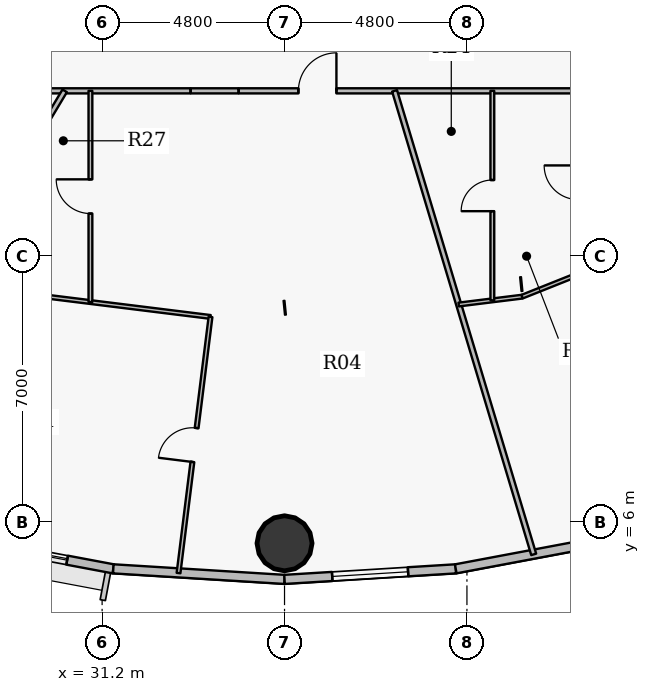
"""IFC4 building model, lengths in metres.
Left out: names, types, materials, properties, quantities, classifications, styles, units other than length and angle.
Written with IfcOpenShell. Run it as: python <this file> out.ifc"""

import sys

from ifc_helpers import new_model, si_unit, direction, frame, frame_2d, origin, origin_2d, place, context, subcontext, project, spatial, rectangle, hollow_circle, extrude, source, transform, mapped, element, fill, save


model = new_model("IFC4")
c1 = context("Model", 3, precision=1e-05, world=origin(), true_north=direction((0.0, 1.0)))
c2 = subcontext(c1, "Body", "Model", "MODEL_VIEW")
j1 = project(units=[si_unit("LENGTHUNIT", "METRE"), si_unit("PLANEANGLEUNIT", "RADIAN")], contexts=[c1])
p1 = place(None, origin())
s1 = spatial("IfcSite", under=j1, at=p1, CompositionType="ELEMENT")
p2 = place(p1, origin())
s2 = spatial("IfcBuilding", under=s1, at=p2, CompositionType="ELEMENT")
p3 = place(p2, frame((0.0, 0.0, 97.2)))
s3 = spatial("IfcBuildingStorey", under=s2, at=p3, CompositionType="ELEMENT", Elevation=97.2)
p4 = place(p3, frame((36.0, 5.445, 0.0), z_axis=(0.0, 0.0, 1.0), x_axis=(1.0, 0.0, 0.0)))
e1 = element("IfcColumn", 1, at=p4, inside=s3, PredefinedType="COLUMN", context=c2, shape_type="SweptSolid", body=[
    extrude(hollow_circle(Radius=0.725, WallThickness=0.042, at=origin_2d()), origin(), (0.0, 0.0, 1.0), 3.75),
])
p5 = place(p3, frame((31.494, 4.773, 0.0), z_axis=(0.0, 0.0, 1.0), x_axis=(-0.982789252177, 0.184730305596, 0.0)))
e2 = element("IfcWall", 2, at=p5, inside=s3, PredefinedType="SOLIDWALL", context=c2, shape_type="SweptSolid", body=[
    extrude(rectangle(XDim=4.471, YDim=0.24, at=frame_2d((2.235, 0.0))), origin(), (0.0, 0.0, 1.0), 3.5),
])
p6 = place(p5, frame((1.236, 0.0, 0.9)))
e3 = element("IfcOpeningElement", 3, at=p6, cuts=e2, PredefinedType="OPENING", context=c2, shape_type="SweptSolid", body=[
    extrude(rectangle(XDim=2.0, YDim=1.75, at=origin_2d()), frame((1.0, 0.13, 0.875), z_axis=(0.0, -1.0, 0.0), x_axis=(1.0, 0.0, 0.0)), (0.0, 0.0, 1.0), 0.26),
])
p7 = place(p3, frame((36.0, 4.495, 0.0), z_axis=(0.0, 0.0, 1.0), x_axis=(-0.998107531589, 0.061492726276, 0.0)))
e4 = element("IfcWall", 4, at=p7, inside=s3, PredefinedType="SOLIDWALL", context=c2, shape_type="SweptSolid", body=[
    extrude(rectangle(XDim=4.514, YDim=0.24, at=frame_2d((2.257, 0.0))), origin(), (0.0, 0.0, 1.0), 3.5),
])
p8 = place(p3, frame((40.506, 4.773, 0.0), z_axis=(0.0, 0.0, 1.0), x_axis=(-0.998107531589, -0.061492726276, 0.0)))
e5 = element("IfcWall", 5, at=p8, inside=s3, PredefinedType="SOLIDWALL", context=c2, shape_type="SweptSolid", body=[
    extrude(rectangle(XDim=4.514, YDim=0.24, at=frame_2d((2.257, 0.0))), origin(), (0.0, 0.0, 1.0), 3.5),
])
p9 = place(p8, frame((1.257, 0.0, 0.9)))
e6 = element("IfcOpeningElement", 6, at=p9, cuts=e5, PredefinedType="OPENING", context=c2, shape_type="SweptSolid", body=[
    extrude(rectangle(XDim=2.0, YDim=1.75, at=origin_2d()), frame((1.0, 0.13, 0.875), z_axis=(0.0, -1.0, 0.0), x_axis=(1.0, 0.0, 0.0)), (0.0, 0.0, 1.0), 0.26),
])
p10 = place(p3, frame((44.9, 5.599, 0.0), z_axis=(0.0, 0.0, 1.0), x_axis=(-0.982789252177, -0.184730305596, 0.0)))
e7 = element("IfcWall", 7, at=p10, inside=s3, PredefinedType="SOLIDWALL", context=c2, shape_type="SweptSolid", body=[
    extrude(rectangle(XDim=4.471, YDim=0.24, at=frame_2d((2.235, 0.0))), origin(), (0.0, 0.0, 1.0), 3.5),
])
p11 = place(p3, frame((23.15, 17.35, 0.0), z_axis=(0.0, 0.0, 1.0), x_axis=(1.0, 0.0, 0.0)))
e8 = element("IfcWall", 8, at=p11, inside=s3, PredefinedType="PARTITIONING", context=c2, shape_type="SweptSolid", body=[
    extrude(rectangle(XDim=10.373, YDim=0.135, at=frame_2d((5.187, 0.0))), origin(), (0.0, 0.0, 1.0), 2.935),
])
p12 = place(p11, frame((0.44, 0.0, 0.0)))
e9 = element("IfcOpeningElement", 9, at=p12, cuts=e8, PredefinedType="OPENING", context=c2, shape_type="SweptSolid", body=[
    extrude(rectangle(XDim=1.0, YDim=2.15, at=origin_2d()), frame((0.5, 0.078, 1.075), z_axis=(0.0, -1.0, 0.0), x_axis=(1.0, 0.0, 0.0)), (0.0, 0.0, 1.0), 0.155),
])
p13 = place(p3, frame((23.808, 6.661, 0.0), z_axis=(0.0, 0.0, 1.0), x_axis=(0.51416439954, 0.857691652195, 0.0)))
e10 = element("IfcWall", 10, at=p13, inside=s3, PredefinedType="PARTITIONING", context=c2, shape_type="SweptSolid", body=[
    extrude(rectangle(XDim=12.462, YDim=0.135, at=frame_2d((6.231, 0.0))), origin(), (0.0, 0.0, 1.0), 2.935),
])
p14 = place(p3, frame((29.749, 11.934, 0.0), z_axis=(0.0, 0.0, 1.0), x_axis=(0.992398657051, -0.123064639455, 0.0)))
e11 = element("IfcWall", 11, at=p14, inside=s3, PredefinedType="PARTITIONING", context=c2, shape_type="SweptSolid", body=[
    extrude(rectangle(XDim=4.337, YDim=0.1, at=frame_2d((2.168, 0.0))), origin(), (0.0, 0.0, 1.0), 3.5),
])
p15 = place(p3, frame((30.892, 11.792, 0.0), z_axis=(0.0, 0.0, 1.0), x_axis=(0.0, 1.0, 0.0)))
e12 = element("IfcWall", 12, at=p15, inside=s3, PredefinedType="PARTITIONING", context=c2, shape_type="SweptSolid", body=[
    extrude(rectangle(XDim=5.558, YDim=0.1, at=frame_2d((2.779, 0.0))), origin(), (0.0, 0.0, 1.0), 3.5),
])
p16 = place(p15, frame((2.329, 0.0, 0.0)))
e13 = element("IfcOpeningElement", 13, at=p16, cuts=e12, PredefinedType="OPENING", context=c2, shape_type="SweptSolid", body=[
    extrude(rectangle(XDim=0.9, YDim=2.1, at=origin_2d()), frame((0.45, 0.06, 1.05), z_axis=(0.0, -1.0, 0.0), x_axis=(1.0, 0.0, 0.0)), (0.0, 0.0, 1.0), 0.12),
])
p17 = place(p3, frame((33.211, 4.662, 0.0), z_axis=(0.0, 0.0, 1.0), x_axis=(0.123884295517, 0.992296670016, 0.0)))
e14 = element("IfcWall", 14, at=p17, inside=s3, PredefinedType="PARTITIONING", context=c2, shape_type="SweptSolid", body=[
    extrude(rectangle(XDim=6.791, YDim=0.1, at=frame_2d((3.396, 0.0))), origin(), (0.0, 0.0, 1.0), 2.935),
])
p18 = place(p17, frame((2.946, 0.0, 0.0)))
e15 = element("IfcOpeningElement", 15, at=p18, cuts=e14, PredefinedType="OPENING", context=c2, shape_type="SweptSolid", body=[
    extrude(rectangle(XDim=0.9, YDim=2.1, at=origin_2d()), frame((0.45, 0.06, 1.05), z_axis=(0.0, -1.0, 0.0), x_axis=(1.0, 0.0, 0.0)), (0.0, 0.0, 1.0), 0.12),
])
p19 = place(p3, frame((34.795, 17.35, 0.0), z_axis=(0.0, 0.0, 1.0), x_axis=(1.0, 0.0, 0.0)))
e16 = element("IfcWall", 16, at=p19, inside=s3, PredefinedType="PARTITIONING", context=c2, shape_type="SweptSolid", body=[
    extrude(rectangle(XDim=14.055, YDim=0.135, at=frame_2d((7.028, 0.0))), origin(), (0.0, 0.0, 1.0), 2.935),
])
p20 = place(p19, frame((1.571, 0.0, 0.0)))
e17 = element("IfcOpeningElement", 17, at=p20, cuts=e16, PredefinedType="OPENING", context=c2, shape_type="SweptSolid", body=[
    extrude(rectangle(XDim=1.0, YDim=2.15, at=origin_2d()), frame((0.5, 0.078, 1.075), z_axis=(0.0, -1.0, 0.0), x_axis=(1.0, 0.0, 0.0)), (0.0, 0.0, 1.0), 0.155),
])
p21 = place(p19, frame((10.976, 0.0, 0.0)))
e18 = element("IfcOpeningElement", 18, at=p21, cuts=e16, PredefinedType="OPENING", context=c2, shape_type="SweptSolid", body=[
    extrude(rectangle(XDim=1.0, YDim=2.15, at=origin_2d()), frame((0.5, 0.078, 1.075), z_axis=(0.0, -1.0, 0.0), x_axis=(1.0, 0.0, 0.0)), (0.0, 0.0, 1.0), 0.155),
])
p22 = place(p3, frame((38.896, 17.35, 0.0), z_axis=(0.0, 0.0, 1.0), x_axis=(0.287463970392, -0.957791452105, 0.0)))
e19 = element("IfcWall", 19, at=p22, inside=s3, PredefinedType="PARTITIONING", context=c2, shape_type="SweptSolid", body=[
    extrude(rectangle(XDim=12.734, YDim=0.135, at=frame_2d((6.367, 0.0))), origin(), (0.0, 0.0, 1.0), 2.935),
])
p23 = place(p3, frame((40.584, 11.728, 0.0), z_axis=(0.0, 0.0, 1.0), x_axis=(0.992400317705, 0.123051247123, 0.0)))
e20 = element("IfcWall", 20, at=p23, inside=s3, PredefinedType="PARTITIONING", context=c2, shape_type="SweptSolid", body=[
    extrude(rectangle(XDim=1.68, YDim=0.1, at=frame_2d((0.84, 0.0))), origin(), (0.0, 0.0, 1.0), 2.935),
])
p24 = place(p3, frame((41.469, 11.837, 0.0), z_axis=(0.0, 0.0, 1.0), x_axis=(0.0, 1.0, 0.0)))
e21 = element("IfcWall", 21, at=p24, inside=s3, PredefinedType="PARTITIONING", context=c2, shape_type="SweptSolid", body=[
    extrude(rectangle(XDim=5.513, YDim=0.1, at=frame_2d((2.756, 0.0))), origin(), (0.0, 0.0, 1.0), 2.935),
])
p25 = place(p24, frame((2.346, 0.0, 0.0)))
e22 = element("IfcOpeningElement", 22, at=p25, cuts=e21, PredefinedType="OPENING", context=c2, shape_type="SweptSolid", body=[
    extrude(rectangle(XDim=0.82, YDim=2.1, at=origin_2d()), frame((0.41, 0.06, 1.05), z_axis=(0.0, -1.0, 0.0), x_axis=(1.0, 0.0, 0.0)), (0.0, 0.0, 1.0), 0.12),
])
p26 = place(p3, frame((42.251, 11.934, 0.0), z_axis=(0.0, 0.0, 1.0), x_axis=(0.928805351872, 0.370567967226, 0.0)))
e23 = element("IfcWall", 23, at=p26, inside=s3, PredefinedType="PARTITIONING", context=c2, shape_type="SweptSolid", body=[
    extrude(rectangle(XDim=5.322, YDim=0.1, at=frame_2d((2.661, 0.0))), origin(), (0.0, 0.0, 1.0), 2.935),
])
p27 = place(p3, frame((34.785, 17.35, 0.0), z_axis=(0.0, 0.0, 1.0), x_axis=(-1.0, 0.0, 0.0)))
e24 = element("IfcWall", 24, at=p27, inside=s3, PredefinedType="PARTITIONING", context=c2, shape_type="SweptSolid", body=[
    extrude(rectangle(XDim=1.252, YDim=0.135, at=frame_2d((0.626, 0.0))), origin(), (0.0, 0.0, 1.0), 3.5),
])
m1 = source(origin(), c2, "Body", "SweptSolid", [
    extrude(rectangle(XDim=2.0, YDim=1.75, at=origin_2d()), frame((1.0, 0.03, 0.875), z_axis=(0.0, -1.0, 0.0), x_axis=(1.0, 0.0, 0.0)), (0.0, 0.0, 1.0), 0.06),
])
p28 = place(p6, origin())
e25 = element("IfcWindow", 25, at=p28, inside=s3, PartitioningType="DOUBLE_PANEL_VERTICAL", PredefinedType="WINDOW", context=c2, shape_type="MappedRepresentation", body=[
    mapped(m1, transform((0.0, 0.0, 0.0), x_axis=(1.0, 0.0, 0.0), y_axis=(0.0, 1.0, 0.0), z_axis=(0.0, 0.0, 1.0), scale=1.0)),
])
fill(e3, e25)
p29 = place(p9, origin())
e26 = element("IfcWindow", 26, at=p29, inside=s3, PartitioningType="DOUBLE_PANEL_VERTICAL", PredefinedType="WINDOW", context=c2, shape_type="MappedRepresentation", body=[
    mapped(m1, transform((0.0, 0.0, 0.0), x_axis=(1.0, 0.0, 0.0), y_axis=(0.0, 1.0, 0.0), z_axis=(0.0, 0.0, 1.0), scale=1.0)),
])
fill(e6, e26)
m2 = source(origin(), c2, "Body", "SweptSolid", [
    extrude(rectangle(XDim=1.0, YDim=2.15, at=origin_2d()), frame((0.5, 0.025, 1.075), z_axis=(0.0, -1.0, 0.0), x_axis=(1.0, 0.0, 0.0)), (0.0, 0.0, 1.0), 0.05),
])
p30 = place(p20, origin())
e27 = element("IfcDoor", 27, at=p30, inside=s3, OperationType="SINGLE_SWING_RIGHT", PredefinedType="DOOR", context=c2, shape_type="MappedRepresentation", body=[
    mapped(m2, transform((0.0, 0.0, 0.0), x_axis=(1.0, 0.0, 0.0), y_axis=(0.0, 1.0, 0.0), z_axis=(0.0, 0.0, 1.0), scale=1.0)),
])
fill(e17, e27)
m3 = source(origin(), c2, "Body", "SweptSolid", [
    extrude(rectangle(XDim=0.9, YDim=2.1, at=origin_2d()), frame((0.45, 0.025, 1.05), z_axis=(0.0, -1.0, 0.0), x_axis=(1.0, 0.0, 0.0)), (0.0, 0.0, 1.0), 0.05),
])
p31 = place(p18, origin())
e28 = element("IfcDoor", 28, at=p31, inside=s3, OperationType="SINGLE_SWING_LEFT", PredefinedType="DOOR", context=c2, shape_type="MappedRepresentation", body=[
    mapped(m3, transform((0.0, 0.0, 0.0), x_axis=(1.0, 0.0, 0.0), y_axis=(0.0, 1.0, 0.0), z_axis=(0.0, 0.0, 1.0), scale=1.0)),
])
fill(e15, e28)
p32 = place(p16, origin())
e29 = element("IfcDoor", 29, at=p32, inside=s3, OperationType="SINGLE_SWING_RIGHT", PredefinedType="DOOR", context=c2, shape_type="MappedRepresentation", body=[
    mapped(m3, transform((0.0, 0.0, 0.0), x_axis=(1.0, 0.0, 0.0), y_axis=(0.0, 1.0, 0.0), z_axis=(0.0, 0.0, 1.0), scale=1.0)),
])
fill(e13, e29)
m4 = source(origin(), c2, "Body", "SweptSolid", [
    extrude(rectangle(XDim=0.82, YDim=2.1, at=origin_2d()), frame((0.41, 0.025, 1.05), z_axis=(0.0, -1.0, 0.0), x_axis=(1.0, 0.0, 0.0)), (0.0, 0.0, 1.0), 0.05),
])
p33 = place(p25, origin())
e30 = element("IfcDoor", 30, at=p33, inside=s3, OperationType="SINGLE_SWING_LEFT", PredefinedType="DOOR", context=c2, shape_type="MappedRepresentation", body=[
    mapped(m4, transform((0.0, 0.0, 0.0), x_axis=(1.0, 0.0, 0.0), y_axis=(0.0, 1.0, 0.0), z_axis=(0.0, 0.0, 1.0), scale=1.0)),
])
fill(e22, e30)
save(model, sys.argv[1])
